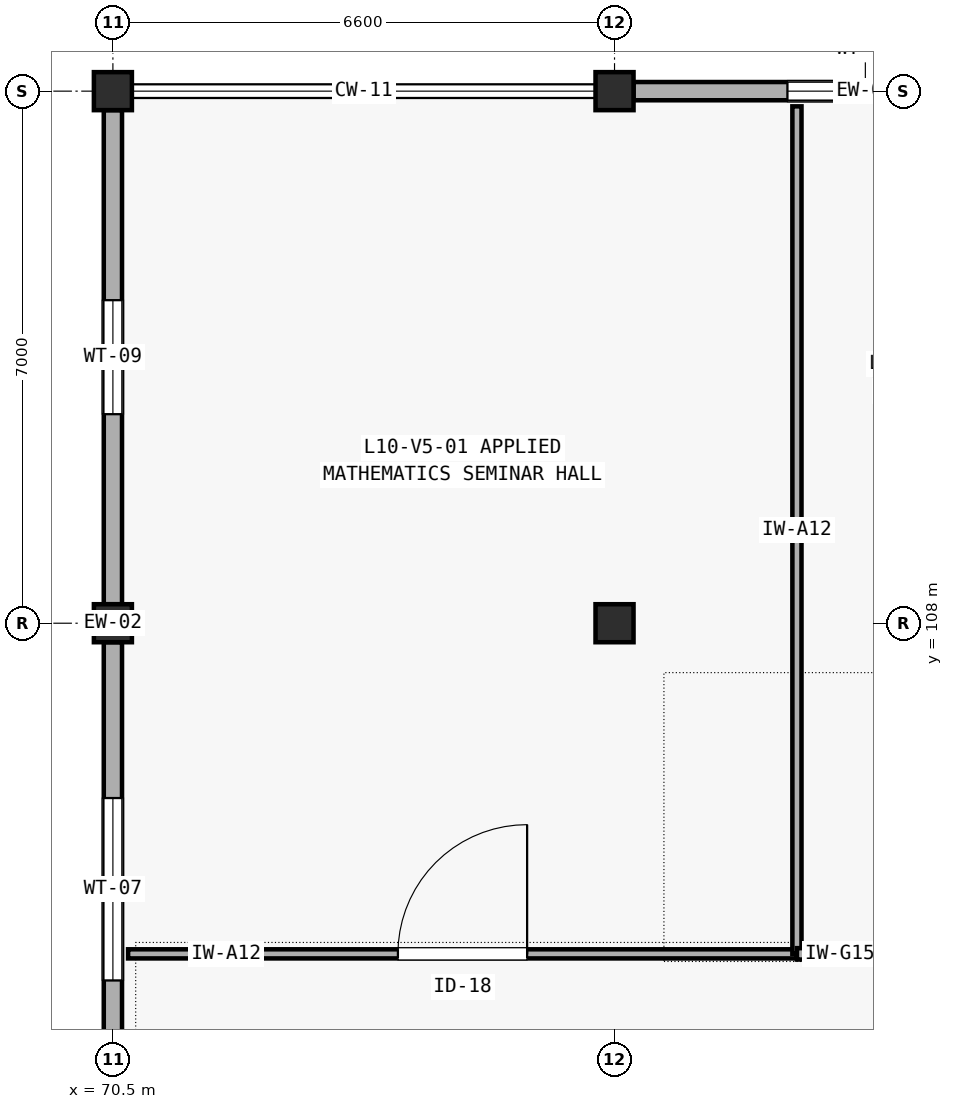
"""IFC4 building model, lengths in metres.
Left out: names, types, materials, properties, quantities, classifications, styles, units other than length and angle.
Written with IfcOpenShell. Run it as: python <this file> out.ifc"""

import sys

from ifc_helpers import new_model, si_unit, direction, frame, frame_2d, origin, origin_2d, place, context, subcontext, project, spatial, rectangle, extrude, element, fill, save


model = new_model("IFC4")
c1 = context("Model", 3, precision=1e-05, world=origin(), true_north=direction((0.0, 1.0)))
c2 = subcontext(c1, "Body", "Model", "MODEL_VIEW")
j1 = project(units=[si_unit("LENGTHUNIT", "METRE"), si_unit("PLANEANGLEUNIT", "RADIAN")], contexts=[c1])
p1 = place(None, origin())
s1 = spatial("IfcSite", under=j1, at=p1, CompositionType="ELEMENT")
p2 = place(p1, origin())
s2 = spatial("IfcBuilding", under=s1, at=p2, CompositionType="ELEMENT")
p3 = place(p2, frame((0.0, 0.0, 42.0)))
s3 = spatial("IfcBuildingStorey", under=s2, at=p3, CompositionType="ELEMENT", Elevation=42.0)
for number, where, z_axis, x_axis in (
    (1, (70.5, 108.0, 0.0), (0.0, 0.0, 1.0), (1.0, 0.0, 0.0)),
    (2, (70.5, 115.0, 0.0), (0.0, 0.0, 1.0), (1.0, 0.0, 0.0)),
    (3, (77.1, 108.0, 0.0), (0.0, 0.0, 1.0), (1.0, 0.0, 0.0)),
    (4, (77.1, 115.0, 0.0), (0.0, 0.0, 1.0), (1.0, 0.0, 0.0)),
):
    element("IfcColumn", number, at=place(p3, frame(where, z_axis=z_axis, x_axis=x_axis)), inside=s3, PredefinedType="COLUMN", context=c2, shape_type="SweptSolid", body=[
        extrude(rectangle(XDim=0.5, YDim=0.5, at=origin_2d()), origin(), (0.0, 0.0, 1.0), 4.2),
    ])
p4 = place(p3, frame((77.35, 115.0, 0.0), z_axis=(0.0, 0.0, 1.0), x_axis=(1.0, 0.0, 0.0)))
e5 = element("IfcWall", 5, at=p4, inside=s3, PredefinedType="SOLIDWALL", context=c2, shape_type="SweptSolid", body=[
    extrude(rectangle(XDim=6.1, YDim=0.24, at=frame_2d((3.05, 0.0))), origin(), (0.0, 0.0, 1.0), 3.385),
])
p5 = place(p4, frame((2.025, 0.0, 0.85)))
e6 = element("IfcOpeningElement", 6, at=p5, cuts=e5, PredefinedType="OPENING", context=c2, shape_type="SweptSolid", body=[
    extrude(rectangle(XDim=2.05, YDim=1.55, at=frame_2d((1.025, 0.775))), frame((0.0, 0.13, 0.0), z_axis=(0.0, -1.0, 0.0), x_axis=(1.0, 0.0, 0.0)), (0.0, 0.0, 1.0), 0.26),
])
p6 = place(p3, frame((70.5, 101.25, 0.0), z_axis=(0.0, 0.0, 1.0), x_axis=(0.0, 1.0, 0.0)))
e7 = element("IfcWall", 7, at=p6, inside=s3, PredefinedType="SOLIDWALL", context=c2, shape_type="SweptSolid", body=[
    extrude(rectangle(XDim=6.5, YDim=0.24, at=frame_2d((3.25, 0.0))), origin(), (0.0, 0.0, 1.0), 3.565),
])
p7 = place(p6, frame((2.05, 0.0, 0.85)))
e8 = element("IfcOpeningElement", 8, at=p7, cuts=e7, PredefinedType="OPENING", context=c2, shape_type="SweptSolid", body=[
    extrude(rectangle(XDim=2.4, YDim=1.35, at=frame_2d((1.2, 0.675))), frame((0.0, 0.13, 0.0), z_axis=(0.0, -1.0, 0.0), x_axis=(1.0, 0.0, 0.0)), (0.0, 0.0, 1.0), 0.26),
])
p8 = place(p3, frame((70.5, 108.25, 0.0), z_axis=(0.0, 0.0, 1.0), x_axis=(0.0, 1.0, 0.0)))
e9 = element("IfcWall", 9, at=p8, inside=s3, PredefinedType="SOLIDWALL", context=c2, shape_type="SweptSolid", body=[
    extrude(rectangle(XDim=6.5, YDim=0.24, at=frame_2d((3.25, 0.0))), origin(), (0.0, 0.0, 1.0), 3.565),
])
p9 = place(p8, frame((2.5, 0.0, 0.85)))
e10 = element("IfcOpeningElement", 10, at=p9, cuts=e9, PredefinedType="OPENING", context=c2, shape_type="SweptSolid", body=[
    extrude(rectangle(XDim=1.5, YDim=1.5, at=frame_2d((0.75, 0.75))), frame((0.0, 0.13, 0.0), z_axis=(0.0, -1.0, 0.0), x_axis=(1.0, 0.0, 0.0)), (0.0, 0.0, 1.0), 0.26),
])
p10 = place(p3, frame((70.7, 103.65, 0.0), z_axis=(0.0, 0.0, 1.0), x_axis=(1.0, 0.0, 0.0)))
e11 = element("IfcWall", 11, at=p10, inside=s3, PredefinedType="PARTITIONING", context=c2, shape_type="SweptSolid", body=[
    extrude(rectangle(XDim=8.8, YDim=0.12, at=frame_2d((4.4, 0.0))), origin(), (0.0, 0.0, 1.0), 3.9),
])
p11 = place(p10, frame((3.55, 0.0, 0.0)))
e12 = element("IfcOpeningElement", 12, at=p11, cuts=e11, PredefinedType="OPENING", context=c2, shape_type="SweptSolid", body=[
    extrude(rectangle(XDim=1.7, YDim=2.2, at=frame_2d((0.85, 1.1))), frame((0.0, 0.07, 0.0), z_axis=(0.0, -1.0, 0.0), x_axis=(1.0, 0.0, 0.0)), (0.0, 0.0, 1.0), 0.14),
])
p12 = place(p3, frame((79.5, 103.65, 0.0), z_axis=(0.0, 0.0, 1.0), x_axis=(0.0, 1.0, 0.0)))
e13 = element("IfcWall", 13, at=p12, inside=s3, PredefinedType="PARTITIONING", context=c2, shape_type="SweptSolid", body=[
    extrude(rectangle(XDim=11.15, YDim=0.12, at=frame_2d((5.575, 0.0))), origin(), (0.0, 0.0, 1.0), 3.577),
])
p13 = place(p3, frame((79.5, 103.65, 0.0), z_axis=(0.0, 0.0, 1.0), x_axis=(1.0, 0.0, 0.0)))
e14 = element("IfcWall", 14, at=p13, inside=s3, PredefinedType="PARTITIONING", context=c2, shape_type="SweptSolid", body=[
    extrude(rectangle(XDim=5.1, YDim=0.15, at=frame_2d((2.55, 0.0))), origin(), (0.0, 0.0, 1.0), 3.9),
])
p14 = place(p13, frame((2.1, 0.0, 0.0)))
e15 = element("IfcOpeningElement", 15, at=p14, cuts=e14, PredefinedType="OPENING", context=c2, shape_type="SweptSolid", body=[
    extrude(rectangle(XDim=0.9, YDim=2.1, at=frame_2d((0.45, 1.05))), frame((0.0, 0.085, 0.0), z_axis=(0.0, -1.0, 0.0), x_axis=(1.0, 0.0, 0.0)), (0.0, 0.0, 1.0), 0.17),
])
p15 = place(p5, origin())
e16 = element("IfcWindow", 16, at=p15, inside=s3, PartitioningType="SINGLE_PANEL", PredefinedType="WINDOW", context=c2, shape_type="SweptSolid", body=[
    extrude(rectangle(XDim=2.05, YDim=1.55, at=frame_2d((1.025, 0.775))), frame((0.0, 0.03, 0.0), z_axis=(0.0, -1.0, 0.0), x_axis=(1.0, 0.0, 0.0)), (0.0, 0.0, 1.0), 0.06),
])
fill(e6, e16)
p16 = place(p7, origin())
e17 = element("IfcWindow", 17, at=p16, inside=s3, PartitioningType="SINGLE_PANEL", PredefinedType="WINDOW", context=c2, shape_type="SweptSolid", body=[
    extrude(rectangle(XDim=2.4, YDim=1.35, at=frame_2d((1.2, 0.675))), frame((0.0, 0.03, 0.0), z_axis=(0.0, -1.0, 0.0), x_axis=(1.0, 0.0, 0.0)), (0.0, 0.0, 1.0), 0.06),
])
fill(e8, e17)
p17 = place(p9, origin())
e18 = element("IfcWindow", 18, at=p17, inside=s3, PartitioningType="SINGLE_PANEL", PredefinedType="WINDOW", context=c2, shape_type="SweptSolid", body=[
    extrude(rectangle(XDim=1.5, YDim=1.5, at=frame_2d((0.75, 0.75))), frame((0.0, 0.03, 0.0), z_axis=(0.0, -1.0, 0.0), x_axis=(1.0, 0.0, 0.0)), (0.0, 0.0, 1.0), 0.06),
])
fill(e10, e18)
p18 = place(p11, origin())
e19 = element("IfcDoor", 19, at=p18, inside=s3, OperationType="SINGLE_SWING_RIGHT", PredefinedType="DOOR", context=c2, shape_type="SweptSolid", body=[
    extrude(rectangle(XDim=1.7, YDim=2.2, at=frame_2d((0.85, 1.1))), frame((0.0, 0.025, 0.0), z_axis=(0.0, -1.0, 0.0), x_axis=(1.0, 0.0, 0.0)), (0.0, 0.0, 1.0), 0.05),
])
fill(e12, e19)
save(model, sys.argv[1])
